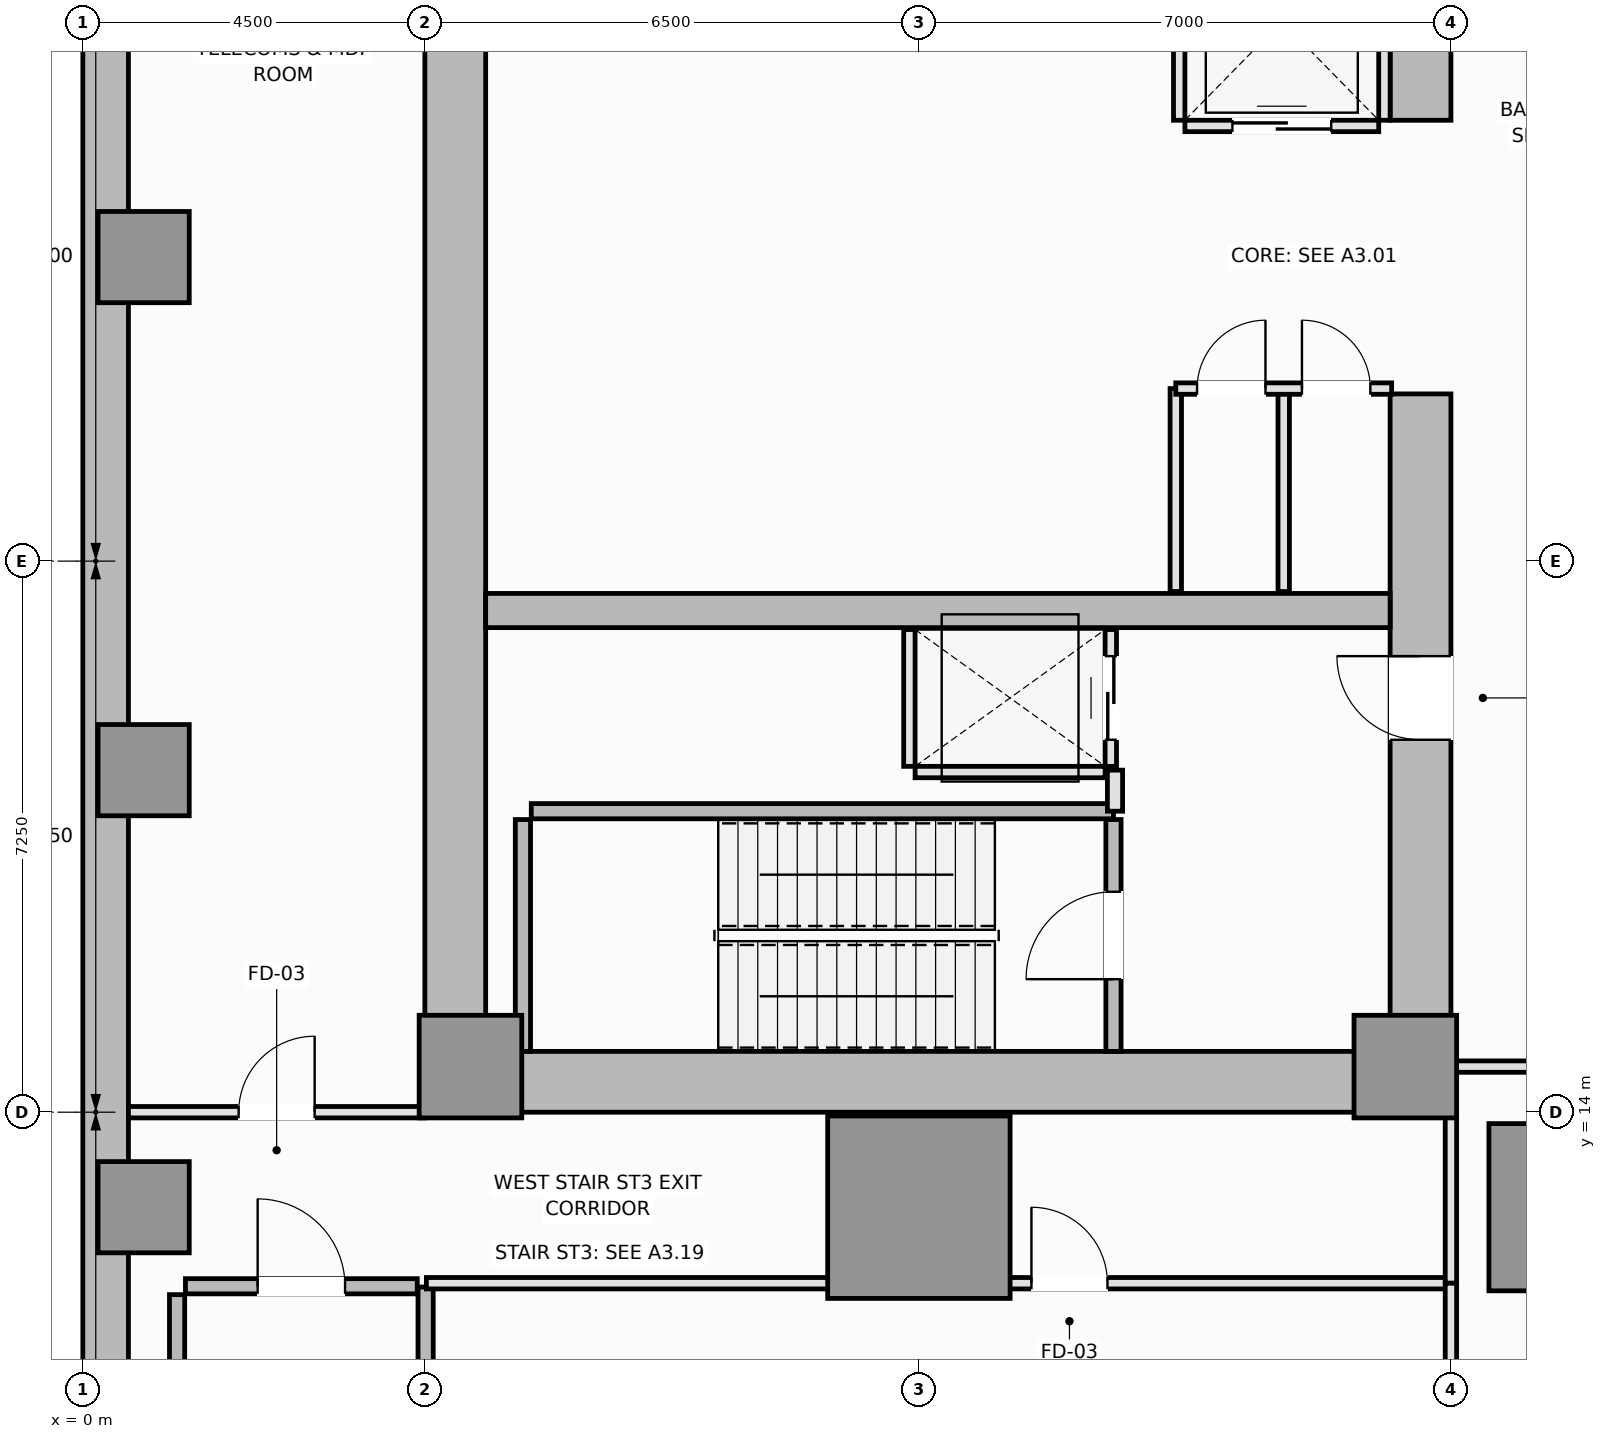
"""IFC4 building model, lengths in metres.
Left out: names, types, materials, properties, quantities, classifications, styles, units other than length and angle.
Written with IfcOpenShell. Run it as: python <this file> out.ifc"""

import sys

from ifc_helpers import new_model, si_unit, direction, frame, frame_2d, origin, origin_2d, place, context, subcontext, project, spatial, rectangle, extrude, element, fill, save


model = new_model("IFC4")
c1 = context("Model", 3, precision=1e-05, world=origin(), true_north=direction((0.0, 1.0)))
c2 = subcontext(c1, "Body", "Model", "MODEL_VIEW")
j1 = project(units=[si_unit("LENGTHUNIT", "METRE"), si_unit("PLANEANGLEUNIT", "RADIAN")], contexts=[c1])
p1 = place(None, origin())
s1 = spatial("IfcSite", under=j1, at=p1, CompositionType="ELEMENT")
p2 = place(p1, origin())
s2 = spatial("IfcBuilding", under=s1, at=p2, CompositionType="ELEMENT")
p3 = place(p2, frame((0.0, 0.0, -4.8)))
s3 = spatial("IfcBuildingStorey", under=s2, at=p3, CompositionType="ELEMENT", Elevation=-4.8)
p4 = place(p3, frame((0.3, 0.6, 0.0), z_axis=(0.0, 0.0, 1.0), x_axis=(0.0, 1.0, 0.0)))
e1 = element("IfcWall", 1, at=p4, inside=s3, PredefinedType="USERDEFINED", context=c2, shape_type="SweptSolid", body=[
    extrude(rectangle(XDim=49.3, YDim=0.6, at=frame_2d((24.65, 0.0))), origin(), (0.0, 0.0, 1.0), 4.8),
])
p5 = place(p3, frame((4.5, 14.4, 0.0), z_axis=(0.0, 0.0, 1.0), x_axis=(1.0, 0.0, 0.0)))
e2 = element("IfcWall", 2, at=p5, inside=s3, PredefinedType="SHEAR", context=c2, shape_type="SweptSolid", body=[
    extrude(rectangle(XDim=13.5, YDim=0.8, at=frame_2d((6.75, 0.0))), origin(), (0.0, 0.0, 1.0), 4.8),
])
p6 = place(p3, frame((4.9, 14.8, 0.0), z_axis=(0.0, 0.0, 1.0), x_axis=(0.0, 1.0, 0.0)))
e3 = element("IfcWall", 3, at=p6, inside=s3, PredefinedType="SHEAR", context=c2, shape_type="SweptSolid", body=[
    extrude(rectangle(XDim=20.9, YDim=0.8, at=frame_2d((10.45, 0.0))), origin(), (0.0, 0.0, 1.0), 4.8),
])
p7 = place(p3, frame((17.6, 14.8, 0.0), z_axis=(0.0, 0.0, 1.0), x_axis=(0.0, 1.0, 0.0)))
e4 = element("IfcWall", 4, at=p7, inside=s3, PredefinedType="SHEAR", context=c2, shape_type="SweptSolid", body=[
    extrude(rectangle(XDim=8.65, YDim=0.8, at=frame_2d((4.325, 0.0))), origin(), (0.0, 0.0, 1.0), 4.8),
])
p8 = place(p7, frame((4.1, 0.0, 0.0)))
e5 = element("IfcOpeningElement", 5, at=p8, cuts=e4, PredefinedType="OPENING", context=c2, shape_type="SweptSolid", body=[
    extrude(rectangle(XDim=1.1, YDim=2.15, at=frame_2d((0.55, 1.075))), frame((0.0, 0.41, 0.0), z_axis=(0.0, -1.0, 0.0), x_axis=(1.0, 0.0, 0.0)), (0.0, 0.0, 1.0), 0.82),
])
p9 = place(p3, frame((17.6, 27.05, 0.0), z_axis=(0.0, 0.0, 1.0), x_axis=(0.0, 1.0, 0.0)))
e6 = element("IfcWall", 6, at=p9, inside=s3, PredefinedType="SHEAR", context=c2, shape_type="SweptSolid", body=[
    extrude(rectangle(XDim=8.65, YDim=0.8, at=frame_2d((4.325, 0.0))), origin(), (0.0, 0.0, 1.0), 4.8),
])
p10 = place(p9, frame((3.45, 0.0, 0.0)))
e7 = element("IfcOpeningElement", 7, at=p10, cuts=e6, PredefinedType="OPENING", context=c2, shape_type="SweptSolid", body=[
    extrude(rectangle(XDim=1.1, YDim=2.15, at=frame_2d((0.55, 1.075))), frame((0.0, 0.41, 0.0), z_axis=(0.0, -1.0, 0.0), x_axis=(1.0, 0.0, 0.0)), (0.0, 0.0, 1.0), 0.82),
])
p11 = place(p3, frame((5.3, 20.6, 0.0), z_axis=(0.0, 0.0, 1.0), x_axis=(1.0, 0.0, 0.0)))
e8 = element("IfcWall", 8, at=p11, inside=s3, PredefinedType="SHEAR", context=c2, shape_type="SweptSolid", body=[
    extrude(rectangle(XDim=11.9, YDim=0.45, at=frame_2d((5.95, 0.0))), origin(), (0.0, 0.0, 1.0), 4.8),
])
for number, where, z_axis, x_axis in (
    (9, (5.1, 14.6, 0.0), (0.0, 0.0, 1.0), (1.0, 0.0, 0.0)),
    (10, (17.4, 14.6, 0.0), (0.0, 0.0, 1.0), (1.0, 0.0, 0.0)),
):
    element("IfcColumn", number, at=place(p3, frame(where, z_axis=z_axis, x_axis=x_axis)), inside=s3, PredefinedType="PILASTER", context=c2, shape_type="SweptSolid", body=[
        extrude(rectangle(XDim=1.35, YDim=1.35, at=origin_2d()), origin(), (0.0, 0.0, 1.0), 4.8),
    ])
p12 = place(p3, frame((11.0, 12.75, 0.0), z_axis=(0.0, 0.0, 1.0), x_axis=(1.0, 0.0, 0.0)))
e11 = element("IfcColumn", 11, at=p12, inside=s3, PredefinedType="COLUMN", context=c2, shape_type="SweptSolid", body=[
    extrude(rectangle(XDim=2.4, YDim=2.4, at=origin_2d()), origin(), (0.0, 0.0, 1.0), 4.8),
])
p13 = place(p3, frame((19.8, 12.75, 0.0), z_axis=(0.0, 0.0, 1.0), x_axis=(1.0, 0.0, 0.0)))
e12 = element("IfcColumn", 12, at=p13, inside=s3, PredefinedType="COLUMN", context=c2, shape_type="SweptSolid", body=[
    extrude(rectangle(XDim=2.6, YDim=2.2, at=origin_2d()), origin(), (0.0, 0.0, 1.0), 4.8),
])
for number, where, z_axis, x_axis in (
    (13, (0.8, 12.75, 0.0), (0.0, 0.0, 1.0), (1.0, 0.0, 0.0)),
    (14, (0.8, 18.5, 0.0), (0.0, 0.0, 1.0), (1.0, 0.0, 0.0)),
    (15, (0.8, 25.25, 0.0), (0.0, 0.0, 1.0), (1.0, 0.0, 0.0)),
):
    element("IfcColumn", number, at=place(p3, frame(where, z_axis=z_axis, x_axis=x_axis)), inside=s3, PredefinedType="COLUMN", context=c2, shape_type="SweptSolid", body=[
        extrude(rectangle(XDim=1.2, YDim=1.2, at=origin_2d()), origin(), (0.0, 0.0, 1.0), 4.8),
    ])
p14 = place(p3, frame((5.79, 14.8, 0.0), z_axis=(0.0, 0.0, 1.0), x_axis=(0.0, 1.0, 0.0)))
e16 = element("IfcWall", 16, at=p14, inside=s3, PredefinedType="SOLIDWALL", context=c2, shape_type="SweptSolid", body=[
    extrude(rectangle(XDim=3.05, YDim=0.2, at=frame_2d((1.525, 0.0))), origin(), (0.0, 0.0, 1.0), 4.8),
])
p15 = place(p3, frame((5.9, 17.96, 0.0), z_axis=(0.0, 0.0, 1.0), x_axis=(1.0, 0.0, 0.0)))
e17 = element("IfcWall", 17, at=p15, inside=s3, PredefinedType="SOLIDWALL", context=c2, shape_type="SweptSolid", body=[
    extrude(rectangle(XDim=7.66, YDim=0.2, at=frame_2d((3.83, 0.0))), origin(), (0.0, 0.0, 1.0), 4.8),
])
p16 = place(p3, frame((13.56, 14.8, 0.0), z_axis=(0.0, 0.0, 1.0), x_axis=(0.0, 1.0, 0.0)))
e18 = element("IfcWall", 18, at=p16, inside=s3, PredefinedType="SOLIDWALL", context=c2, shape_type="SweptSolid", body=[
    extrude(rectangle(XDim=3.05, YDim=0.2, at=frame_2d((1.525, 0.0))), origin(), (0.0, 0.0, 1.0), 4.8),
])
p17 = place(p16, frame((0.95, 0.0, 0.0)))
e19 = element("IfcOpeningElement", 19, at=p17, cuts=e18, PredefinedType="OPENING", context=c2, shape_type="SweptSolid", body=[
    extrude(rectangle(XDim=1.15, YDim=2.15, at=frame_2d((0.575, 1.075))), frame((0.0, 0.11, 0.0), z_axis=(0.0, -1.0, 0.0), x_axis=(1.0, 0.0, 0.0)), (0.0, 0.0, 1.0), 0.22),
])
p18 = place(p3, frame((1.24, 4.05, 0.0), z_axis=(0.0, 0.0, 1.0), x_axis=(0.0, 1.0, 0.0)))
e20 = element("IfcWall", 20, at=p18, inside=s3, PredefinedType="SOLIDWALL", context=c2, shape_type="SweptSolid", body=[
    extrude(rectangle(XDim=7.55, YDim=0.2, at=frame_2d((3.775, 0.0))), origin(), (0.0, 0.0, 1.0), 4.8),
])
p19 = place(p3, frame((4.51, 4.05, 0.0), z_axis=(0.0, 0.0, 1.0), x_axis=(0.0, 1.0, 0.0)))
e21 = element("IfcWall", 21, at=p19, inside=s3, PredefinedType="SOLIDWALL", context=c2, shape_type="SweptSolid", body=[
    extrude(rectangle(XDim=7.65, YDim=0.2, at=frame_2d((3.825, 0.0))), origin(), (0.0, 0.0, 1.0), 4.8),
])
p20 = place(p3, frame((1.35, 11.71, 0.0), z_axis=(0.0, 0.0, 1.0), x_axis=(1.0, 0.0, 0.0)))
e22 = element("IfcWall", 22, at=p20, inside=s3, PredefinedType="SOLIDWALL", context=c2, shape_type="SweptSolid", body=[
    extrude(rectangle(XDim=3.05, YDim=0.2, at=frame_2d((1.525, 0.0))), origin(), (0.0, 0.0, 1.0), 4.8),
])
p21 = place(p20, frame((0.95, 0.0, 0.0)))
e23 = element("IfcOpeningElement", 23, at=p21, cuts=e22, PredefinedType="OPENING", context=c2, shape_type="SweptSolid", body=[
    extrude(rectangle(XDim=1.15, YDim=2.15, at=frame_2d((0.575, 1.075))), frame((0.0, 0.11, 0.0), z_axis=(0.0, -1.0, 0.0), x_axis=(1.0, 0.0, 0.0)), (0.0, 0.0, 1.0), 0.22),
])
p22 = place(p3, frame((14.5, 26.975, 0.0), z_axis=(0.0, 0.0, 1.0), x_axis=(1.0, 0.0, 0.0)))
e24 = element("IfcWall", 24, at=p22, inside=s3, PredefinedType="PARTITIONING", context=c2, shape_type="SweptSolid", body=[
    extrude(rectangle(XDim=2.55, YDim=0.15, at=frame_2d((1.275, 0.0))), origin(), (0.0, 0.0, 1.0), 4.6),
])
p23 = place(p22, frame((0.625, 0.0, 0.0)))
e25 = element("IfcOpeningElement", 25, at=p23, cuts=e24, PredefinedType="OPENING", context=c2, shape_type="SweptSolid", body=[
    extrude(rectangle(XDim=1.3, YDim=2.2, at=frame_2d((0.65, 1.1))), frame((0.0, 0.085, 0.0), z_axis=(0.0, -1.0, 0.0), x_axis=(1.0, 0.0, 0.0)), (0.0, 0.0, 1.0), 0.17),
])
for number, where, z_axis, x_axis in (
    (26, (14.425, 27.05, 0.0), (0.0, 0.0, 1.0), (0.0, 1.0, 0.0)),
    (27, (17.125, 27.05, 0.0), (0.0, 0.0, 1.0), (0.0, 1.0, 0.0)),
):
    element("IfcWall", number, at=place(p3, frame(where, z_axis=z_axis, x_axis=x_axis)), inside=s3, PredefinedType="PARTITIONING", context=c2, shape_type="SweptSolid", body=[
        extrude(rectangle(XDim=2.6, YDim=0.15, at=frame_2d((1.3, 0.0))), origin(), (0.0, 0.0, 1.0), 4.6),
    ])
p24 = place(p3, frame((10.95, 18.475, 0.0), z_axis=(0.0, 0.0, 1.0), x_axis=(1.0, 0.0, 0.0)))
e28 = element("IfcWall", 28, at=p24, inside=s3, PredefinedType="PARTITIONING", context=c2, shape_type="SweptSolid", body=[
    extrude(rectangle(XDim=2.5, YDim=0.15, at=frame_2d((1.25, 0.0))), origin(), (0.0, 0.0, 1.0), 4.6),
])
p25 = place(p3, frame((10.875, 18.55, 0.0), z_axis=(0.0, 0.0, 1.0), x_axis=(0.0, 1.0, 0.0)))
e29 = element("IfcWall", 29, at=p25, inside=s3, PredefinedType="PARTITIONING", context=c2, shape_type="SweptSolid", body=[
    extrude(rectangle(XDim=1.8, YDim=0.15, at=frame_2d((0.9, 0.0))), origin(), (0.0, 0.0, 1.0), 4.6),
])
p26 = place(p3, frame((13.525, 18.55, 0.0), z_axis=(0.0, 0.0, 1.0), x_axis=(0.0, 1.0, 0.0)))
e30 = element("IfcWall", 30, at=p26, inside=s3, PredefinedType="PARTITIONING", context=c2, shape_type="SweptSolid", body=[
    extrude(rectangle(XDim=1.8, YDim=0.15, at=frame_2d((0.9, 0.0))), origin(), (0.0, 0.0, 1.0), 4.6),
])
p27 = place(p26, frame((0.35, 0.0, 0.0)))
e31 = element("IfcOpeningElement", 31, at=p27, cuts=e30, PredefinedType="OPENING", context=c2, shape_type="SweptSolid", body=[
    extrude(rectangle(XDim=1.1, YDim=2.2, at=frame_2d((0.55, 1.1))), frame((0.0, 0.085, 0.0), z_axis=(0.0, -1.0, 0.0), x_axis=(1.0, 0.0, 0.0)), (0.0, 0.0, 1.0), 0.17),
])
p28 = place(p3, frame((13.58, 17.96, 0.0), z_axis=(0.0, 0.0, 1.0), x_axis=(0.0, 1.0, 0.0)))
e32 = element("IfcWall", 32, at=p28, inside=s3, PredefinedType="PARTITIONING", context=c2, shape_type="SweptSolid", body=[
    extrude(rectangle(XDim=0.54, YDim=0.2, at=frame_2d((0.27, 0.0))), origin(), (0.0, 0.0, 1.0), 4.6),
])
for number, where, z_axis, x_axis in (
    (33, (14.38, 20.85, 0.0), (0.0, 0.0, 1.0), (0.0, 1.0, 0.0)),
    (34, (15.8, 20.85, 0.0), (0.0, 0.0, 1.0), (0.0, 1.0, 0.0)),
):
    element("IfcWall", number, at=place(p3, frame(where, z_axis=z_axis, x_axis=x_axis)), inside=s3, PredefinedType="PARTITIONING", context=c2, shape_type="SweptSolid", body=[
        extrude(rectangle(XDim=2.67, YDim=0.15, at=frame_2d((1.335, 0.0))), origin(), (0.0, 0.0, 1.0), 4.6),
    ])
p29 = place(p3, frame((14.38, 23.52, 0.0), z_axis=(0.0, 0.0, 1.0), x_axis=(1.0, 0.0, 0.0)))
e35 = element("IfcWall", 35, at=p29, inside=s3, PredefinedType="PARTITIONING", context=c2, shape_type="SweptSolid", body=[
    extrude(rectangle(XDim=2.84, YDim=0.15, at=frame_2d((1.42, 0.0))), origin(), (0.0, 0.0, 1.0), 4.6),
])
p30 = place(p29, frame((0.28, 0.0, 0.0)))
e36 = element("IfcOpeningElement", 36, at=p30, cuts=e35, PredefinedType="OPENING", context=c2, shape_type="SweptSolid", body=[
    extrude(rectangle(XDim=0.9, YDim=2.1, at=frame_2d((0.45, 1.05))), frame((0.0, 0.085, 0.0), z_axis=(0.0, -1.0, 0.0), x_axis=(1.0, 0.0, 0.0)), (0.0, 0.0, 1.0), 0.17),
])
p31 = place(p29, frame((1.66, 0.0, 0.0)))
e37 = element("IfcOpeningElement", 37, at=p31, cuts=e35, PredefinedType="OPENING", context=c2, shape_type="SweptSolid", body=[
    extrude(rectangle(XDim=0.9, YDim=2.1, at=frame_2d((0.45, 1.05))), frame((0.0, 0.085, 0.0), z_axis=(0.0, -1.0, 0.0), x_axis=(1.0, 0.0, 0.0)), (0.0, 0.0, 1.0), 0.17),
])
p32 = place(p3, frame((18.0, 14.6, 0.0), z_axis=(0.0, 0.0, 1.0), x_axis=(1.0, 0.0, 0.0)))
e38 = element("IfcWall", 38, at=p32, inside=s3, PredefinedType="PARTITIONING", context=c2, shape_type="SweptSolid", body=[
    extrude(rectangle(XDim=5.3, YDim=0.15, at=frame_2d((2.65, 0.0))), origin(), (0.0, 0.0, 1.0), 4.6),
])
p33 = place(p32, frame((3.39, 0.0, 0.0)))
e39 = element("IfcOpeningElement", 39, at=p33, cuts=e38, PredefinedType="OPENING", context=c2, shape_type="SweptSolid", body=[
    extrude(rectangle(XDim=1.0, YDim=2.15, at=frame_2d((0.5, 1.075))), frame((0.0, 0.085, 0.0), z_axis=(0.0, -1.0, 0.0), x_axis=(1.0, 0.0, 0.0)), (0.0, 0.0, 1.0), 0.17),
])
p34 = place(p3, frame((4.52, 11.75, 0.0), z_axis=(0.0, 0.0, 1.0), x_axis=(1.0, 0.0, 0.0)))
e40 = element("IfcWall", 40, at=p34, inside=s3, PredefinedType="PARTITIONING", context=c2, shape_type="SweptSolid", body=[
    extrude(rectangle(XDim=13.48, YDim=0.15, at=frame_2d((6.74, 0.0))), origin(), (0.0, 0.0, 1.0), 4.6),
])
p35 = place(p34, frame((7.961, 0.0, 0.0)))
e41 = element("IfcOpeningElement", 41, at=p35, cuts=e40, PredefinedType="OPENING", context=c2, shape_type="SweptSolid", body=[
    extrude(rectangle(XDim=1.0, YDim=2.15, at=frame_2d((0.5, 1.075))), frame((0.0, 0.085, 0.0), z_axis=(0.0, -1.0, 0.0), x_axis=(1.0, 0.0, 0.0)), (0.0, 0.0, 1.0), 0.17),
])
p36 = place(p3, frame((0.6, 14.0, 0.0), z_axis=(0.0, 0.0, 1.0), x_axis=(1.0, 0.0, 0.0)))
e42 = element("IfcWall", 42, at=p36, inside=s3, PredefinedType="PARTITIONING", context=c2, shape_type="SweptSolid", body=[
    extrude(rectangle(XDim=3.9, YDim=0.15, at=frame_2d((1.95, 0.0))), origin(), (0.0, 0.0, 1.0), 4.6),
])
p37 = place(p36, frame((1.45, 0.0, 0.0)))
e43 = element("IfcOpeningElement", 43, at=p37, cuts=e42, PredefinedType="OPENING", context=c2, shape_type="SweptSolid", body=[
    extrude(rectangle(XDim=1.0, YDim=2.15, at=frame_2d((0.5, 1.075))), frame((0.0, 0.085, 0.0), z_axis=(0.0, -1.0, 0.0), x_axis=(1.0, 0.0, 0.0)), (0.0, 0.0, 1.0), 0.17),
])
p38 = place(p3, frame((18.0, 11.75, 0.0), z_axis=(0.0, 0.0, 1.0), x_axis=(0.0, 1.0, 0.0)))
e44 = element("IfcWall", 44, at=p38, inside=s3, PredefinedType="PARTITIONING", context=c2, shape_type="SweptSolid", body=[
    extrude(rectangle(XDim=2.25, YDim=0.15, at=frame_2d((1.125, 0.0))), origin(), (0.0, 0.0, 1.0), 4.6),
])
p39 = place(p3, frame((18.0, 0.6, 0.0), z_axis=(0.0, 0.0, 1.0), x_axis=(0.0, 1.0, 0.0)))
e45 = element("IfcWall", 45, at=p39, inside=s3, PredefinedType="PARTITIONING", context=c2, shape_type="SweptSolid", body=[
    extrude(rectangle(XDim=11.15, YDim=0.15, at=frame_2d((5.575, 0.0))), origin(), (0.0, 0.0, 1.0), 4.6),
])
p40 = place(p17, origin())
e46 = element("IfcDoor", 46, at=p40, inside=s3, OperationType="SINGLE_SWING_LEFT", PredefinedType="DOOR", context=c2, shape_type="SweptSolid", body=[
    extrude(rectangle(XDim=1.15, YDim=2.15, at=frame_2d((0.575, 1.075))), frame((0.0, 0.025, 0.0), z_axis=(0.0, -1.0, 0.0), x_axis=(1.0, 0.0, 0.0)), (0.0, 0.0, 1.0), 0.05),
])
fill(e19, e46)
p41 = place(p21, origin())
e47 = element("IfcDoor", 47, at=p41, inside=s3, OperationType="SINGLE_SWING_LEFT", PredefinedType="DOOR", context=c2, shape_type="SweptSolid", body=[
    extrude(rectangle(XDim=1.15, YDim=2.15, at=frame_2d((0.575, 1.075))), frame((0.0, 0.025, 0.0), z_axis=(0.0, -1.0, 0.0), x_axis=(1.0, 0.0, 0.0)), (0.0, 0.0, 1.0), 0.05),
])
fill(e23, e47)
p42 = place(p23, origin())
e48 = element("IfcDoor", 48, at=p42, inside=s3, OperationType="DOUBLE_DOOR_SLIDING", PredefinedType="DOOR", context=c2, shape_type="SweptSolid", body=[
    extrude(rectangle(XDim=1.3, YDim=2.2, at=frame_2d((0.65, 1.1))), frame((0.0, 0.025, 0.0), z_axis=(0.0, -1.0, 0.0), x_axis=(1.0, 0.0, 0.0)), (0.0, 0.0, 1.0), 0.05),
])
fill(e25, e48)
p43 = place(p27, origin())
e49 = element("IfcDoor", 49, at=p43, inside=s3, OperationType="DOUBLE_DOOR_SLIDING", PredefinedType="DOOR", context=c2, shape_type="SweptSolid", body=[
    extrude(rectangle(XDim=1.1, YDim=2.2, at=frame_2d((0.55, 1.1))), frame((0.0, 0.025, 0.0), z_axis=(0.0, -1.0, 0.0), x_axis=(1.0, 0.0, 0.0)), (0.0, 0.0, 1.0), 0.05),
])
fill(e31, e49)
p44 = place(p8, origin())
e50 = element("IfcDoor", 50, at=p44, inside=s3, OperationType="SINGLE_SWING_RIGHT", PredefinedType="DOOR", context=c2, shape_type="SweptSolid", body=[
    extrude(rectangle(XDim=1.1, YDim=2.15, at=frame_2d((0.55, 1.075))), frame((0.0, 0.025, 0.0), z_axis=(0.0, -1.0, 0.0), x_axis=(1.0, 0.0, 0.0)), (0.0, 0.0, 1.0), 0.05),
])
fill(e5, e50)
p45 = place(p30, origin())
e51 = element("IfcDoor", 51, at=p45, inside=s3, OperationType="SINGLE_SWING_RIGHT", PredefinedType="DOOR", context=c2, shape_type="SweptSolid", body=[
    extrude(rectangle(XDim=0.9, YDim=2.1, at=frame_2d((0.45, 1.05))), frame((0.0, 0.025, 0.0), z_axis=(0.0, -1.0, 0.0), x_axis=(1.0, 0.0, 0.0)), (0.0, 0.0, 1.0), 0.05),
])
fill(e36, e51)
p46 = place(p31, origin())
e52 = element("IfcDoor", 52, at=p46, inside=s3, OperationType="SINGLE_SWING_LEFT", PredefinedType="DOOR", context=c2, shape_type="SweptSolid", body=[
    extrude(rectangle(XDim=0.9, YDim=2.1, at=frame_2d((0.45, 1.05))), frame((0.0, 0.025, 0.0), z_axis=(0.0, -1.0, 0.0), x_axis=(1.0, 0.0, 0.0)), (0.0, 0.0, 1.0), 0.05),
])
fill(e37, e52)
p47 = place(p35, origin())
e53 = element("IfcDoor", 53, at=p47, inside=s3, OperationType="SINGLE_SWING_LEFT", PredefinedType="DOOR", context=c2, shape_type="SweptSolid", body=[
    extrude(rectangle(XDim=1.0, YDim=2.15, at=frame_2d((0.5, 1.075))), frame((0.0, 0.025, 0.0), z_axis=(0.0, -1.0, 0.0), x_axis=(1.0, 0.0, 0.0)), (0.0, 0.0, 1.0), 0.05),
])
fill(e41, e53)
p48 = place(p37, origin())
e54 = element("IfcDoor", 54, at=p48, inside=s3, OperationType="SINGLE_SWING_RIGHT", PredefinedType="DOOR", context=c2, shape_type="SweptSolid", body=[
    extrude(rectangle(XDim=1.0, YDim=2.15, at=frame_2d((0.5, 1.075))), frame((0.0, 0.025, 0.0), z_axis=(0.0, -1.0, 0.0), x_axis=(1.0, 0.0, 0.0)), (0.0, 0.0, 1.0), 0.05),
])
fill(e43, e54)
save(model, sys.argv[1])
